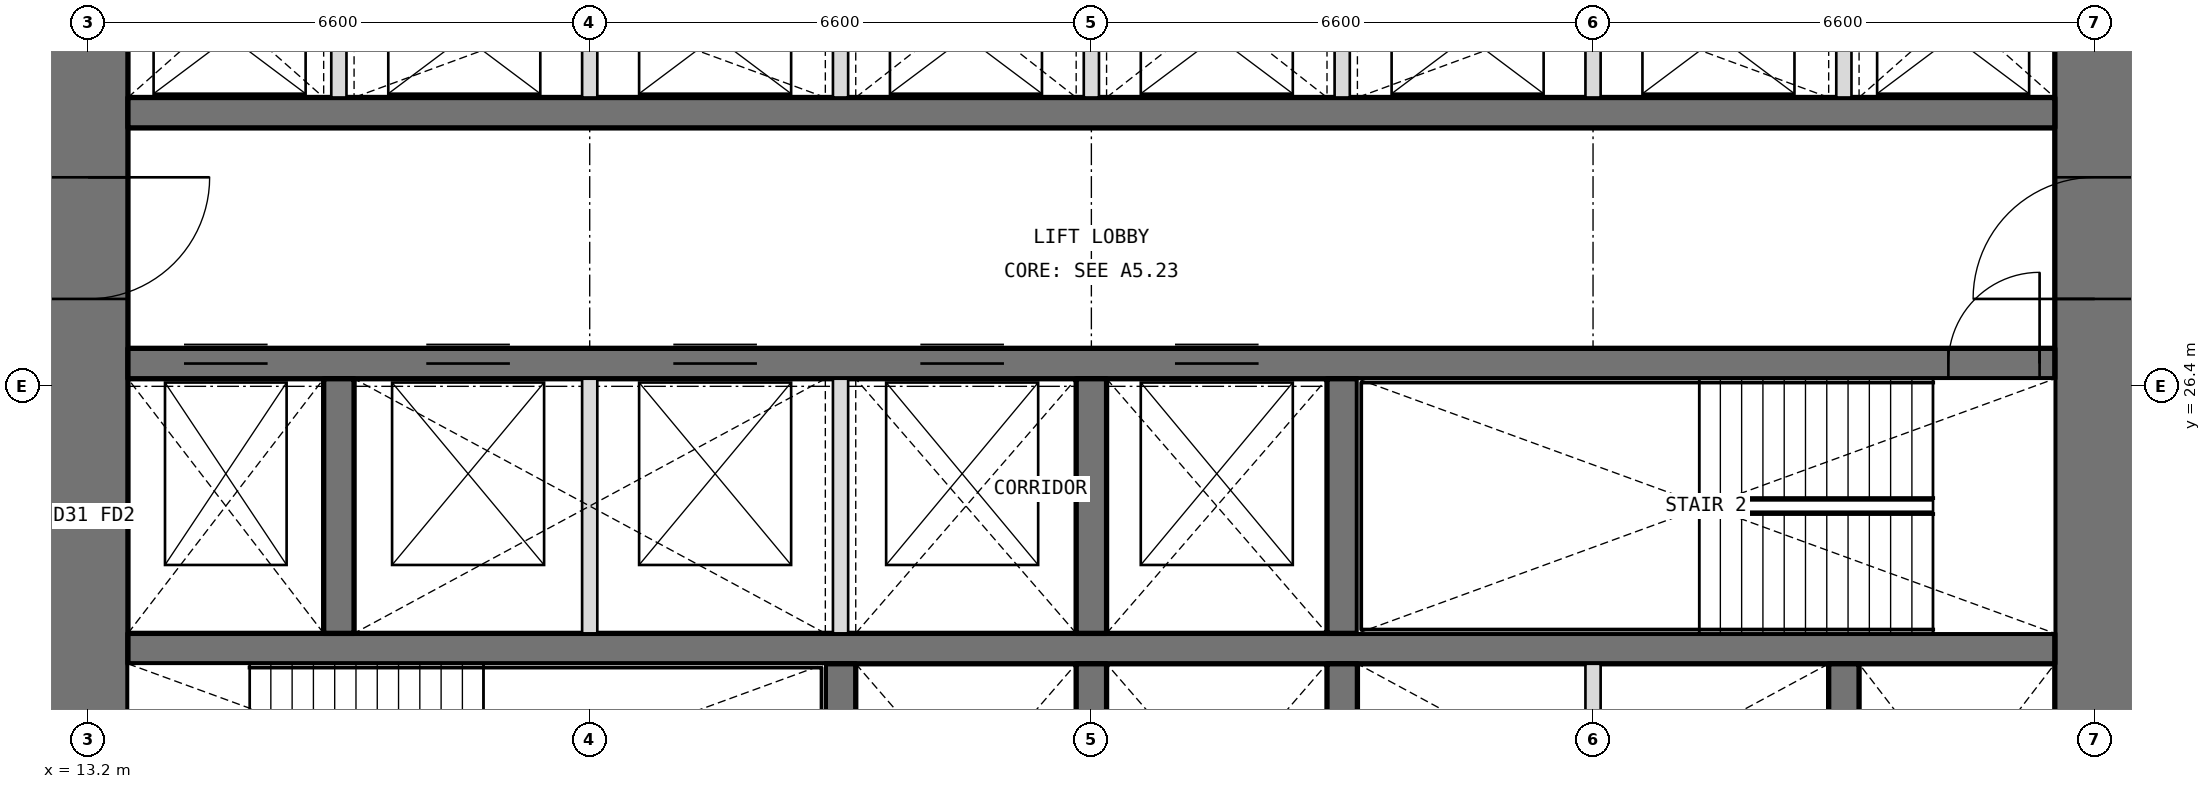
"""IFC4 building model, lengths in metres.
Left out: names, types, materials, properties, quantities, classifications, styles, units other than length and angle.
Written with IfcOpenShell. Run it as: python <this file> out.ifc"""

import sys

from ifc_helpers import new_model, si_unit, direction, frame, frame_2d, origin, place, context, subcontext, project, spatial, rectangle, extrude, element, fill, save


model = new_model("IFC4")
c1 = context("Model", 3, precision=1e-05, world=origin(), true_north=direction((0.0, 1.0)))
c2 = subcontext(c1, "Body", "Model", "MODEL_VIEW")
j1 = project(units=[si_unit("LENGTHUNIT", "METRE"), si_unit("PLANEANGLEUNIT", "RADIAN")], contexts=[c1])
p1 = place(None, origin())
s1 = spatial("IfcSite", under=j1, at=p1, CompositionType="ELEMENT")
p2 = place(p1, origin())
s2 = spatial("IfcBuilding", under=s1, at=p2, CompositionType="ELEMENT")
p3 = place(p2, frame((0.0, 0.0, 94.8)))
s3 = spatial("IfcBuildingStorey", under=s2, at=p3, CompositionType="ELEMENT", Elevation=94.8)
p4 = place(p3, frame((39.6, 13.725, 0.0), z_axis=(0.0, 0.0, 1.0), x_axis=(0.0, 1.0, 0.0)))
e1 = element("IfcWall", 1, at=p4, inside=s3, PredefinedType="SHEAR", context=c2, shape_type="SweptSolid", body=[
    extrude(rectangle(XDim=18.75, YDim=1.05, at=frame_2d((9.375, 0.0))), origin(), (0.0, 0.0, 1.0), 4.2),
])
p5 = place(p4, frame((3.025, 0.0, 0.0)))
e2 = element("IfcOpeningElement", 2, at=p5, cuts=e1, PredefinedType="OPENING", context=c2, shape_type="SweptSolid", body=[
    extrude(rectangle(XDim=1.6, YDim=2.1, at=frame_2d((0.8, 1.05))), frame((0.0, 0.535, 0.0), z_axis=(0.0, -1.0, 0.0), x_axis=(1.0, 0.0, 0.0)), (0.0, 0.0, 1.0), 1.07),
])
p6 = place(p4, frame((13.825, 0.0, 0.0)))
e3 = element("IfcOpeningElement", 3, at=p6, cuts=e1, PredefinedType="OPENING", context=c2, shape_type="SweptSolid", body=[
    extrude(rectangle(XDim=1.6, YDim=2.1, at=frame_2d((0.8, 1.05))), frame((0.0, 0.535, 0.0), z_axis=(0.0, -1.0, 0.0), x_axis=(1.0, 0.0, 0.0)), (0.0, 0.0, 1.0), 1.07),
])
p7 = place(p3, frame((13.2, 32.475, 0.0), z_axis=(0.0, 0.0, 1.0), x_axis=(0.0, -1.0, 0.0)))
e4 = element("IfcWall", 4, at=p7, inside=s3, PredefinedType="SHEAR", context=c2, shape_type="SweptSolid", body=[
    extrude(rectangle(XDim=18.75, YDim=1.05, at=frame_2d((9.375, 0.0))), origin(), (0.0, 0.0, 1.0), 4.2),
])
p8 = place(p7, frame((14.125, 0.0, 0.0)))
e5 = element("IfcOpeningElement", 5, at=p8, cuts=e4, PredefinedType="OPENING", context=c2, shape_type="SweptSolid", body=[
    extrude(rectangle(XDim=1.6, YDim=2.1, at=frame_2d((0.8, 1.05))), frame((0.0, 0.535, 0.0), z_axis=(0.0, -1.0, 0.0), x_axis=(1.0, 0.0, 0.0)), (0.0, 0.0, 1.0), 1.07),
])
p9 = place(p7, frame((3.325, 0.0, 0.0)))
e6 = element("IfcOpeningElement", 6, at=p9, cuts=e4, PredefinedType="OPENING", context=c2, shape_type="SweptSolid", body=[
    extrude(rectangle(XDim=1.6, YDim=2.1, at=frame_2d((0.8, 1.05))), frame((0.0, 0.535, 0.0), z_axis=(0.0, -1.0, 0.0), x_axis=(1.0, 0.0, 0.0)), (0.0, 0.0, 1.0), 1.07),
])
p10 = place(p3, frame((13.725, 22.95, 0.0), z_axis=(0.0, 0.0, 1.0), x_axis=(1.0, 0.0, 0.0)))
e7 = element("IfcWall", 7, at=p10, inside=s3, PredefinedType="SHEAR", context=c2, shape_type="SweptSolid", body=[
    extrude(rectangle(XDim=25.35, YDim=0.4, at=frame_2d((12.675, 0.0))), origin(), (0.0, 0.0, 1.0), 4.2),
])
p11 = place(p3, frame((13.725, 26.7, 0.0), z_axis=(0.0, 0.0, 1.0), x_axis=(1.0, 0.0, 0.0)))
e8 = element("IfcWall", 8, at=p11, inside=s3, PredefinedType="SHEAR", context=c2, shape_type="SweptSolid", body=[
    extrude(rectangle(XDim=25.35, YDim=0.4, at=frame_2d((12.675, 0.0))), origin(), (0.0, 0.0, 1.0), 4.2),
])
p12 = place(p11, frame((23.95, 0.0, 0.0)))
e9 = element("IfcOpeningElement", 9, at=p12, cuts=e8, PredefinedType="OPENING", context=c2, shape_type="SweptSolid", body=[
    extrude(rectangle(XDim=1.2, YDim=2.1, at=frame_2d((0.6, 1.05))), frame((0.0, 0.21, 0.0), z_axis=(0.0, -1.0, 0.0), x_axis=(1.0, 0.0, 0.0)), (0.0, 0.0, 1.0), 0.42),
])
p13 = place(p11, frame((0.738, 0.0, 0.0)))
e10 = element("IfcOpeningElement", 10, at=p13, cuts=e8, PredefinedType="OPENING", context=c2, shape_type="SweptSolid", body=[
    extrude(rectangle(XDim=1.1, YDim=2.1, at=frame_2d((0.55, 1.05))), frame((0.0, 0.21, 0.0), z_axis=(0.0, -1.0, 0.0), x_axis=(1.0, 0.0, 0.0)), (0.0, 0.0, 1.0), 0.42),
])
p14 = place(p11, frame((3.925, 0.0, 0.0)))
e11 = element("IfcOpeningElement", 11, at=p14, cuts=e8, PredefinedType="OPENING", context=c2, shape_type="SweptSolid", body=[
    extrude(rectangle(XDim=1.1, YDim=2.1, at=frame_2d((0.55, 1.05))), frame((0.0, 0.21, 0.0), z_axis=(0.0, -1.0, 0.0), x_axis=(1.0, 0.0, 0.0)), (0.0, 0.0, 1.0), 0.42),
])
p15 = place(p11, frame((7.175, 0.0, 0.0)))
e12 = element("IfcOpeningElement", 12, at=p15, cuts=e8, PredefinedType="OPENING", context=c2, shape_type="SweptSolid", body=[
    extrude(rectangle(XDim=1.1, YDim=2.1, at=frame_2d((0.55, 1.05))), frame((0.0, 0.21, 0.0), z_axis=(0.0, -1.0, 0.0), x_axis=(1.0, 0.0, 0.0)), (0.0, 0.0, 1.0), 0.42),
])
p16 = place(p11, frame((10.425, 0.0, 0.0)))
e13 = element("IfcOpeningElement", 13, at=p16, cuts=e8, PredefinedType="OPENING", context=c2, shape_type="SweptSolid", body=[
    extrude(rectangle(XDim=1.1, YDim=2.1, at=frame_2d((0.55, 1.05))), frame((0.0, 0.21, 0.0), z_axis=(0.0, -1.0, 0.0), x_axis=(1.0, 0.0, 0.0)), (0.0, 0.0, 1.0), 0.42),
])
p17 = place(p11, frame((13.775, 0.0, 0.0)))
e14 = element("IfcOpeningElement", 14, at=p17, cuts=e8, PredefinedType="OPENING", context=c2, shape_type="SweptSolid", body=[
    extrude(rectangle(XDim=1.1, YDim=2.1, at=frame_2d((0.55, 1.05))), frame((0.0, 0.21, 0.0), z_axis=(0.0, -1.0, 0.0), x_axis=(1.0, 0.0, 0.0)), (0.0, 0.0, 1.0), 0.42),
])
p18 = place(p3, frame((13.725, 30.0, 0.0), z_axis=(0.0, 0.0, 1.0), x_axis=(1.0, 0.0, 0.0)))
e15 = element("IfcWall", 15, at=p18, inside=s3, PredefinedType="SHEAR", context=c2, shape_type="SweptSolid", body=[
    extrude(rectangle(XDim=25.35, YDim=0.4, at=frame_2d((12.675, 0.0))), origin(), (0.0, 0.0, 1.0), 4.2),
])
for number, where, z_axis, x_axis in (
    (16, (23.1, 19.4, 0.0), (0.0, 0.0, 1.0), (0.0, 1.0, 0.0)),
    (17, (26.4, 19.4, 0.0), (0.0, 0.0, 1.0), (0.0, 1.0, 0.0)),
    (18, (29.7, 19.4, 0.0), (0.0, 0.0, 1.0), (0.0, 1.0, 0.0)),
    (19, (36.3, 19.4, 0.0), (0.0, 0.0, 1.0), (0.0, 1.0, 0.0)),
    (20, (16.5, 23.15, 0.0), (0.0, 0.0, 1.0), (0.0, 1.0, 0.0)),
    (21, (26.4, 23.15, 0.0), (0.0, 0.0, 1.0), (0.0, 1.0, 0.0)),
    (22, (29.7, 23.15, 0.0), (0.0, 0.0, 1.0), (0.0, 1.0, 0.0)),
):
    element("IfcWall", number, at=place(p3, frame(where, z_axis=z_axis, x_axis=x_axis)), inside=s3, PredefinedType="SHEAR", context=c2, shape_type="SweptSolid", body=[
        extrude(rectangle(XDim=3.35, YDim=0.4, at=frame_2d((1.675, 0.0))), origin(), (0.0, 0.0, 1.0), 4.2),
    ])
for number, where, z_axis, x_axis in (
    (23, (16.5, 30.2, 0.0), (0.0, 0.0, 1.0), (0.0, 1.0, 0.0)),
    (24, (19.8, 30.2, 0.0), (0.0, 0.0, 1.0), (0.0, 1.0, 0.0)),
    (25, (23.1, 30.2, 0.0), (0.0, 0.0, 1.0), (0.0, 1.0, 0.0)),
    (26, (26.4, 30.2, 0.0), (0.0, 0.0, 1.0), (0.0, 1.0, 0.0)),
    (27, (29.7, 30.2, 0.0), (0.0, 0.0, 1.0), (0.0, 1.0, 0.0)),
    (28, (33.0, 30.2, 0.0), (0.0, 0.0, 1.0), (0.0, 1.0, 0.0)),
    (29, (36.3, 30.2, 0.0), (0.0, 0.0, 1.0), (0.0, 1.0, 0.0)),
):
    element("IfcWall", number, at=place(p3, frame(where, z_axis=z_axis, x_axis=x_axis)), inside=s3, PredefinedType="PARTITIONING", context=c2, shape_type="SweptSolid", body=[
        extrude(rectangle(XDim=2.275, YDim=0.2, at=frame_2d((1.138, 0.0))), origin(), (0.0, 0.0, 1.0), 4.2),
    ])
for number, where, z_axis, x_axis in (
    (30, (33.0, 19.4, 0.0), (0.0, 0.0, 1.0), (0.0, 1.0, 0.0)),
    (31, (19.8, 23.15, 0.0), (0.0, 0.0, 1.0), (0.0, 1.0, 0.0)),
    (32, (23.1, 23.15, 0.0), (0.0, 0.0, 1.0), (0.0, 1.0, 0.0)),
):
    element("IfcWall", number, at=place(p3, frame(where, z_axis=z_axis, x_axis=x_axis)), inside=s3, PredefinedType="PARTITIONING", context=c2, shape_type="SweptSolid", body=[
        extrude(rectangle(XDim=3.35, YDim=0.2, at=frame_2d((1.675, 0.0))), origin(), (0.0, 0.0, 1.0), 4.2),
    ])
p19 = place(p12, origin())
e33 = element("IfcDoor", 33, at=p19, inside=s3, OperationType="SINGLE_SWING_RIGHT", PredefinedType="DOOR", context=c2, shape_type="SweptSolid", body=[
    extrude(rectangle(XDim=1.2, YDim=2.1, at=frame_2d((0.6, 1.05))), frame((0.0, 0.025, 0.0), z_axis=(0.0, -1.0, 0.0), x_axis=(1.0, 0.0, 0.0)), (0.0, 0.0, 1.0), 0.05),
])
fill(e9, e33)
p20 = place(p9, origin())
e34 = element("IfcDoor", 34, at=p20, inside=s3, OperationType="DOUBLE_DOOR_DOUBLE_SWING", PredefinedType="DOOR", context=c2, shape_type="SweptSolid", body=[
    extrude(rectangle(XDim=1.6, YDim=2.1, at=frame_2d((0.8, 1.05))), frame((0.0, 0.025, 0.0), z_axis=(0.0, -1.0, 0.0), x_axis=(1.0, 0.0, 0.0)), (0.0, 0.0, 1.0), 0.05),
])
fill(e6, e34)
p21 = place(p6, origin())
e35 = element("IfcDoor", 35, at=p21, inside=s3, OperationType="DOUBLE_DOOR_DOUBLE_SWING", PredefinedType="DOOR", context=c2, shape_type="SweptSolid", body=[
    extrude(rectangle(XDim=1.6, YDim=2.1, at=frame_2d((0.8, 1.05))), frame((0.0, 0.025, 0.0), z_axis=(0.0, -1.0, 0.0), x_axis=(1.0, 0.0, 0.0)), (0.0, 0.0, 1.0), 0.05),
])
fill(e3, e35)
p22 = place(p13, origin())
e36 = element("IfcDoor", 36, at=p22, inside=s3, OperationType="DOUBLE_DOOR_SLIDING", PredefinedType="DOOR", context=c2, shape_type="SweptSolid", body=[
    extrude(rectangle(XDim=1.1, YDim=2.1, at=frame_2d((0.55, 1.05))), frame((0.0, 0.025, 0.0), z_axis=(0.0, -1.0, 0.0), x_axis=(1.0, 0.0, 0.0)), (0.0, 0.0, 1.0), 0.05),
])
fill(e10, e36)
p23 = place(p14, origin())
e37 = element("IfcDoor", 37, at=p23, inside=s3, OperationType="DOUBLE_DOOR_SLIDING", PredefinedType="DOOR", context=c2, shape_type="SweptSolid", body=[
    extrude(rectangle(XDim=1.1, YDim=2.1, at=frame_2d((0.55, 1.05))), frame((0.0, 0.025, 0.0), z_axis=(0.0, -1.0, 0.0), x_axis=(1.0, 0.0, 0.0)), (0.0, 0.0, 1.0), 0.05),
])
fill(e11, e37)
p24 = place(p15, origin())
e38 = element("IfcDoor", 38, at=p24, inside=s3, OperationType="DOUBLE_DOOR_SLIDING", PredefinedType="DOOR", context=c2, shape_type="SweptSolid", body=[
    extrude(rectangle(XDim=1.1, YDim=2.1, at=frame_2d((0.55, 1.05))), frame((0.0, 0.025, 0.0), z_axis=(0.0, -1.0, 0.0), x_axis=(1.0, 0.0, 0.0)), (0.0, 0.0, 1.0), 0.05),
])
fill(e12, e38)
p25 = place(p16, origin())
e39 = element("IfcDoor", 39, at=p25, inside=s3, OperationType="DOUBLE_DOOR_SLIDING", PredefinedType="DOOR", context=c2, shape_type="SweptSolid", body=[
    extrude(rectangle(XDim=1.1, YDim=2.1, at=frame_2d((0.55, 1.05))), frame((0.0, 0.025, 0.0), z_axis=(0.0, -1.0, 0.0), x_axis=(1.0, 0.0, 0.0)), (0.0, 0.0, 1.0), 0.05),
])
fill(e13, e39)
p26 = place(p17, origin())
e40 = element("IfcDoor", 40, at=p26, inside=s3, OperationType="DOUBLE_DOOR_SLIDING", PredefinedType="DOOR", context=c2, shape_type="SweptSolid", body=[
    extrude(rectangle(XDim=1.1, YDim=2.1, at=frame_2d((0.55, 1.05))), frame((0.0, 0.025, 0.0), z_axis=(0.0, -1.0, 0.0), x_axis=(1.0, 0.0, 0.0)), (0.0, 0.0, 1.0), 0.05),
])
fill(e14, e40)
save(model, sys.argv[1])
